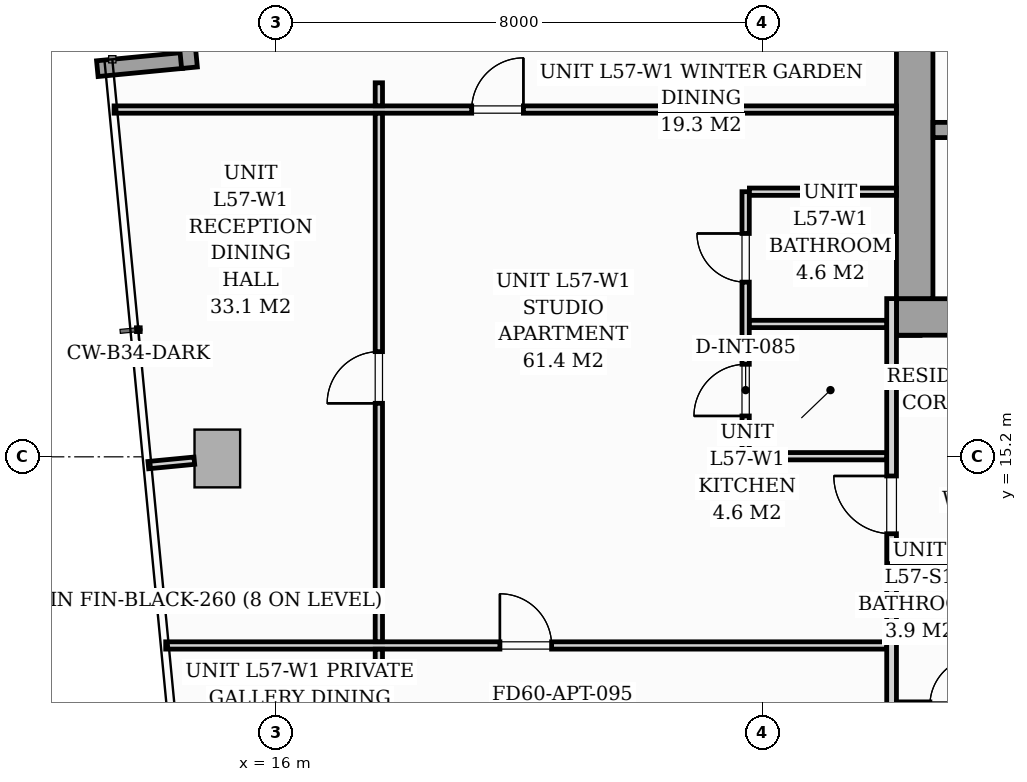
"""IFC4 building model, lengths in metres.
Left out: names, types, materials, properties, quantities, classifications, styles, units other than length and angle.
Written with IfcOpenShell. Run it as: python <this file> out.ifc"""

import sys

from ifc_helpers import new_model, si_unit, direction, frame, frame_2d, origin, origin_2d, place, context, subcontext, project, spatial, rectangle, i_section, extrude, source, transform, mapped, element, fill, save


model = new_model("IFC4")
c1 = context("Model", 3, precision=1e-05, world=origin(), true_north=direction((0.0, 1.0)))
c2 = subcontext(c1, "Body", "Model", "MODEL_VIEW")
j1 = project(units=[si_unit("LENGTHUNIT", "METRE"), si_unit("PLANEANGLEUNIT", "RADIAN")], contexts=[c1])
p1 = place(None, origin())
s1 = spatial("IfcSite", under=j1, at=p1, CompositionType="ELEMENT")
p2 = place(p1, origin())
s2 = spatial("IfcBuilding", under=s1, at=p2, CompositionType="ELEMENT")
p3 = place(p2, frame((0.0, 0.0, 198.6)))
s3 = spatial("IfcBuildingStorey", under=s2, at=p3, CompositionType="ELEMENT", Elevation=198.6)
m1 = source(origin(), c2, "Body", "SweptSolid", [
    extrude(i_section(OverallWidth=0.416, OverallDepth=0.446, WebThickness=0.039, FlangeThickness=0.063, FilletRadius=0.018, at=origin_2d()), origin(), (0.0, 0.0, 1.0), 3.196),
])
p4 = place(p3, frame((26.4, 17.4, 0.002), z_axis=(0.0, 0.0, 1.0), x_axis=(1.0, 0.0, 0.0)))
e1 = element("IfcColumn", 1, at=p4, inside=s3, PredefinedType="PILASTER", context=c2, shape_type="MappedRepresentation", body=[
    mapped(m1, transform((0.0, 0.0, 0.0), scale=1.0)),
])
m2 = source(origin(), c2, "Body", "SweptSolid", [
    extrude(rectangle(XDim=0.75, YDim=0.95, at=origin_2d()), origin(), (0.0, 0.0, 1.0), 3.196),
])
p5 = place(p3, frame((15.032, 15.173, 0.002), z_axis=(0.0, 0.0, 1.0), x_axis=(0.995396198367, 0.09584575252, 0.0)))
e2 = element("IfcColumn", 2, at=p5, inside=s3, PredefinedType="COLUMN", context=c2, shape_type="MappedRepresentation", body=[
    mapped(m2, transform((0.0, 0.0, 0.0), scale=1.0)),
])
p6 = place(p3, frame((13.058, 21.583, 0.0), z_axis=(0.0, 0.0, 1.0), x_axis=(0.99540774648, 0.095725744959, 0.0)))
e3 = element("IfcWall", 3, at=p6, inside=s3, PredefinedType="STANDARD", context=c2, shape_type="SweptSolid", body=[
    extrude(rectangle(XDim=1.395, YDim=0.26, at=frame_2d((0.698, 0.0))), origin(), (0.0, 0.0, 1.0), 2.94),
])
p7 = place(p3, frame((14.574, 21.599, 0.0), z_axis=(0.0, 0.0, 1.0), x_axis=(-0.095742423056, 0.99540614245, 0.0)))
e4 = element("IfcWall", 4, at=p7, inside=s3, PredefinedType="STANDARD", context=c2, shape_type="SweptSolid", body=[
    extrude(rectangle(XDim=1.395, YDim=0.26, at=frame_2d((0.697, 0.0))), origin(), (0.0, 0.0, 1.0), 2.94),
])
p8 = place(p3, frame((26.2, 17.5, 0.0), z_axis=(0.0, 0.0, 1.0), x_axis=(1.0, 0.0, 0.0)))
e5 = element("IfcWall", 5, at=p8, inside=s3, PredefinedType="SHEAR", context=c2, shape_type="SweptSolid", body=[
    extrude(rectangle(XDim=19.6, YDim=0.6, at=frame_2d((9.8, 0.0))), origin(), (0.0, 0.0, 1.0), 3.2),
])
p9 = place(p8, frame((0.95, 0.0, 0.0)))
e6 = element("IfcOpeningElement", 6, at=p9, cuts=e5, PredefinedType="OPENING", context=c2, shape_type="SweptSolid", body=[
    extrude(rectangle(XDim=0.95, YDim=2.06, at=frame_2d((0.475, 1.03))), frame((0.0, 0.31, 0.0), z_axis=(0.0, -1.0, 0.0), x_axis=(1.0, 0.0, 0.0)), (0.0, 0.0, 1.0), 0.62),
])
p10 = place(p8, frame((9.38, 0.0, 0.0)))
e7 = element("IfcOpeningElement", 7, at=p10, cuts=e5, PredefinedType="OPENING", context=c2, shape_type="SweptSolid", body=[
    extrude(rectangle(XDim=0.85, YDim=2.0, at=frame_2d((0.425, 1.0))), frame((0.0, 0.31, 0.0), z_axis=(0.0, -1.0, 0.0), x_axis=(1.0, 0.0, 0.0)), (0.0, 0.0, 1.0), 0.62),
])
p11 = place(p8, frame((17.55, 0.0, 0.0)))
e8 = element("IfcOpeningElement", 8, at=p11, cuts=e5, PredefinedType="OPENING", context=c2, shape_type="SweptSolid", body=[
    extrude(rectangle(XDim=0.95, YDim=2.06, at=frame_2d((0.475, 1.03))), frame((0.0, 0.31, 0.0), z_axis=(0.0, -1.0, 0.0), x_axis=(1.0, 0.0, 0.0)), (0.0, 0.0, 1.0), 0.62),
])
p12 = place(p3, frame((26.5, 17.802, 0.0), z_axis=(0.0, 0.0, 1.0), x_axis=(0.0, 1.0, 0.0)))
e9 = element("IfcWall", 9, at=p12, inside=s3, PredefinedType="SHEAR", context=c2, shape_type="SweptSolid", body=[
    extrude(rectangle(XDim=5.796, YDim=0.6, at=frame_2d((2.898, 0.0))), origin(), (0.0, 0.0, 1.0), 3.2),
])
p13 = place(p3, frame((26.802, 20.575, 0.0), z_axis=(0.0, 0.0, 1.0), x_axis=(1.0, 0.0, 0.0)))
e10 = element("IfcWall", 10, at=p13, inside=s3, PredefinedType="SOLIDWALL", context=c2, shape_type="SweptSolid", body=[
    extrude(rectangle(XDim=8.148, YDim=0.25, at=frame_2d((4.074, 0.0))), origin(), (0.0, 0.0, 1.0), 3.2),
])
p14 = place(p13, frame((0.298, 0.0, 0.0)))
e11 = element("IfcOpeningElement", 11, at=p14, cuts=e10, PredefinedType="OPENING", context=c2, shape_type="SweptSolid", body=[
    extrude(rectangle(XDim=0.95, YDim=2.06, at=frame_2d((0.475, 1.03))), frame((0.0, 0.135, 0.0), z_axis=(0.0, -1.0, 0.0), x_axis=(1.0, 0.0, 0.0)), (0.0, 0.0, 1.0), 0.27),
])
p15 = place(p3, frame((26.12, 13.36, 0.0), z_axis=(0.0, 0.0, 1.0), x_axis=(1.0, 0.0, 0.0)))
e12 = element("IfcWall", 12, at=p15, inside=s3, PredefinedType="PARTITIONING", context=c2, shape_type="SweptSolid", body=[
    extrude(rectangle(XDim=19.76, YDim=0.16, at=frame_2d((9.88, 0.0))), origin(), (0.0, 0.0, 1.0), 2.94),
])
p16 = place(p15, frame((5.221, 0.0, 0.0)))
e13 = element("IfcOpeningElement", 13, at=p16, cuts=e12, PredefinedType="OPENING", context=c2, shape_type="SweptSolid", body=[
    extrude(rectangle(XDim=0.95, YDim=2.06, at=frame_2d((0.475, 1.03))), frame((0.0, 0.09, 0.0), z_axis=(0.0, -1.0, 0.0), x_axis=(1.0, 0.0, 0.0)), (0.0, 0.0, 1.0), 0.18),
])
p17 = place(p15, frame((12.119, 0.0, 0.0)))
e14 = element("IfcOpeningElement", 14, at=p17, cuts=e12, PredefinedType="OPENING", context=c2, shape_type="SweptSolid", body=[
    extrude(rectangle(XDim=0.95, YDim=2.06, at=frame_2d((0.475, 1.03))), frame((0.0, 0.09, 0.0), z_axis=(0.0, -1.0, 0.0), x_axis=(1.0, 0.0, 0.0)), (0.0, 0.0, 1.0), 0.18),
])
p18 = place(p15, frame((14.492, 0.0, 0.0)))
e15 = element("IfcOpeningElement", 15, at=p18, cuts=e12, PredefinedType="OPENING", context=c2, shape_type="SweptSolid", body=[
    extrude(rectangle(XDim=0.95, YDim=2.06, at=frame_2d((0.475, 1.03))), frame((0.0, 0.09, 0.0), z_axis=(0.0, -1.0, 0.0), x_axis=(1.0, 0.0, 0.0)), (0.0, 0.0, 1.0), 0.18),
])
p19 = place(p3, frame((26.12, 7.261, 0.0), z_axis=(0.0, 0.0, 1.0), x_axis=(0.0, 1.0, 0.0)))
e16 = element("IfcWall", 16, at=p19, inside=s3, PredefinedType="PARTITIONING", context=c2, shape_type="SweptSolid", body=[
    extrude(rectangle(XDim=6.017, YDim=0.16, at=frame_2d((3.008, 0.0))), origin(), (0.0, 0.0, 1.0), 2.94),
])
p20 = place(p3, frame((26.12, 13.442, 0.0), z_axis=(0.0, 0.0, 1.0), x_axis=(0.0, 1.0, 0.0)))
e17 = element("IfcWall", 17, at=p20, inside=s3, PredefinedType="PARTITIONING", context=c2, shape_type="SweptSolid", body=[
    extrude(rectangle(XDim=4.36, YDim=0.16, at=frame_2d((2.18, 0.0))), origin(), (0.0, 0.0, 1.0), 2.94),
])
p21 = place(p20, frame((0.493, 0.0, 0.0)))
e18 = element("IfcOpeningElement", 18, at=p21, cuts=e17, PredefinedType="OPENING", context=c2, shape_type="SweptSolid", body=[
    extrude(rectangle(XDim=0.95, YDim=2.06, at=frame_2d((0.475, 1.03))), frame((0.0, 0.09, 0.0), z_axis=(0.0, -1.0, 0.0), x_axis=(1.0, 0.0, 0.0)), (0.0, 0.0, 1.0), 0.18),
])
p22 = place(p3, frame((26.202, 11.11, 0.0), z_axis=(0.0, 0.0, 1.0), x_axis=(1.0, 0.0, 0.0)))
e19 = element("IfcWall", 19, at=p22, inside=s3, PredefinedType="PARTITIONING", context=c2, shape_type="SweptSolid", body=[
    extrude(rectangle(XDim=4.098, YDim=0.12, at=frame_2d((2.049, 0.0))), origin(), (0.0, 0.0, 1.0), 2.94),
])
p23 = place(p22, frame((0.548, 0.0, 0.0)))
e20 = element("IfcOpeningElement", 20, at=p23, cuts=e19, PredefinedType="OPENING", context=c2, shape_type="SweptSolid", body=[
    extrude(rectangle(XDim=0.8, YDim=2.02, at=frame_2d((0.4, 1.01))), frame((0.0, 0.07, 0.0), z_axis=(0.0, -1.0, 0.0), x_axis=(1.0, 0.0, 0.0)), (0.0, 0.0, 1.0), 0.14),
])
p24 = place(p22, frame((2.573, 0.0, 0.0)))
e21 = element("IfcOpeningElement", 21, at=p24, cuts=e19, PredefinedType="OPENING", context=c2, shape_type="SweptSolid", body=[
    extrude(rectangle(XDim=0.85, YDim=2.05, at=frame_2d((0.425, 1.025))), frame((0.0, 0.07, 0.0), z_axis=(0.0, -1.0, 0.0), x_axis=(1.0, 0.0, 0.0)), (0.0, 0.0, 1.0), 0.14),
])
p25 = place(p3, frame((23.72, 15.21, 0.0), z_axis=(0.0, 0.0, 1.0), x_axis=(0.0, 1.0, 0.0)))
e22 = element("IfcWall", 22, at=p25, inside=s3, PredefinedType="PARTITIONING", context=c2, shape_type="SweptSolid", body=[
    extrude(rectangle(XDim=4.35, YDim=0.12, at=frame_2d((2.175, 0.0))), origin(), (0.0, 0.0, 1.0), 2.94),
])
p26 = place(p25, frame((0.662, 0.0, 0.0)))
e23 = element("IfcOpeningElement", 23, at=p26, cuts=e22, PredefinedType="OPENING", context=c2, shape_type="SweptSolid", body=[
    extrude(rectangle(XDim=0.85, YDim=2.05, at=frame_2d((0.425, 1.025))), frame((0.0, 0.07, 0.0), z_axis=(0.0, -1.0, 0.0), x_axis=(1.0, 0.0, 0.0)), (0.0, 0.0, 1.0), 0.14),
])
p27 = place(p25, frame((2.863, 0.0, 0.0)))
e24 = element("IfcOpeningElement", 24, at=p27, cuts=e22, PredefinedType="OPENING", context=c2, shape_type="SweptSolid", body=[
    extrude(rectangle(XDim=0.8, YDim=2.02, at=frame_2d((0.4, 1.01))), frame((0.0, 0.07, 0.0), z_axis=(0.0, -1.0, 0.0), x_axis=(1.0, 0.0, 0.0)), (0.0, 0.0, 1.0), 0.14),
])
p28 = place(p3, frame((23.782, 17.385, 0.0), z_axis=(0.0, 0.0, 1.0), x_axis=(1.0, 0.0, 0.0)))
e25 = element("IfcWall", 25, at=p28, inside=s3, PredefinedType="PARTITIONING", context=c2, shape_type="SweptSolid", body=[
    extrude(rectangle(XDim=2.256, YDim=0.12, at=frame_2d((1.128, 0.0))), origin(), (0.0, 0.0, 1.0), 2.281),
])
p29 = place(p3, frame((23.782, 15.21, 0.0), z_axis=(0.0, 0.0, 1.0), x_axis=(1.0, 0.0, 0.0)))
e26 = element("IfcWall", 26, at=p29, inside=s3, PredefinedType="PARTITIONING", context=c2, shape_type="SweptSolid", body=[
    extrude(rectangle(XDim=2.256, YDim=0.12, at=frame_2d((1.128, 0.0))), origin(), (0.0, 0.0, 1.0), 2.94),
])
p30 = place(p3, frame((23.782, 19.56, 0.0), z_axis=(0.0, 0.0, 1.0), x_axis=(1.0, 0.0, 0.0)))
e27 = element("IfcWall", 27, at=p30, inside=s3, PredefinedType="PARTITIONING", context=c2, shape_type="SweptSolid", body=[
    extrude(rectangle(XDim=2.416, YDim=0.12, at=frame_2d((1.208, 0.0))), origin(), (0.0, 0.0, 1.0), 2.94),
])
p31 = place(p3, frame((14.183, 12.098, 0.0), z_axis=(0.0, 0.0, 1.0), x_axis=(1.0, 0.0, 0.0)))
e28 = element("IfcWall", 28, at=p31, inside=s3, PredefinedType="PARTITIONING", context=c2, shape_type="SweptSolid", body=[
    extrude(rectangle(XDim=11.855, YDim=0.12, at=frame_2d((5.928, 0.0))), origin(), (0.0, 0.0, 1.0), 2.94),
])
p32 = place(p31, frame((5.496, 0.0, 0.0)))
e29 = element("IfcOpeningElement", 29, at=p32, cuts=e28, PredefinedType="OPENING", context=c2, shape_type="SweptSolid", body=[
    extrude(rectangle(XDim=0.85, YDim=2.05, at=frame_2d((0.425, 1.025))), frame((0.0, 0.07, 0.0), z_axis=(0.0, -1.0, 0.0), x_axis=(1.0, 0.0, 0.0)), (0.0, 0.0, 1.0), 0.14),
])
p33 = place(p3, frame((13.334, 20.911, 0.0), z_axis=(0.0, 0.0, 1.0), x_axis=(1.0, 0.0, 0.0)))
e30 = element("IfcWall", 30, at=p33, inside=s3, PredefinedType="PARTITIONING", context=c2, shape_type="SweptSolid", body=[
    extrude(rectangle(XDim=12.864, YDim=0.12, at=frame_2d((6.432, 0.0))), origin(), (0.0, 0.0, 1.0), 2.94),
])
p34 = place(p33, frame((5.881, 0.0, 0.0)))
e31 = element("IfcOpeningElement", 31, at=p34, cuts=e30, PredefinedType="OPENING", context=c2, shape_type="SweptSolid", body=[
    extrude(rectangle(XDim=0.85, YDim=2.05, at=frame_2d((0.425, 1.025))), frame((0.0, 0.07, 0.0), z_axis=(0.0, -1.0, 0.0), x_axis=(1.0, 0.0, 0.0)), (0.0, 0.0, 1.0), 0.14),
])
p35 = place(p3, frame((17.688, 11.658, 0.0), z_axis=(0.0, 0.0, 1.0), x_axis=(0.0, 1.0, 0.0)))
e32 = element("IfcWall", 32, at=p35, inside=s3, PredefinedType="PARTITIONING", context=c2, shape_type="SweptSolid", body=[
    extrude(rectangle(XDim=0.378, YDim=0.12, at=frame_2d((0.189, 0.0))), origin(), (0.0, 0.0, 1.0), 2.94),
])
p36 = place(p3, frame((17.688, 12.16, 0.0), z_axis=(0.0, 0.0, 1.0), x_axis=(0.0, 1.0, 0.0)))
e33 = element("IfcWall", 33, at=p36, inside=s3, PredefinedType="PARTITIONING", context=c2, shape_type="SweptSolid", body=[
    extrude(rectangle(XDim=8.689, YDim=0.12, at=frame_2d((4.345, 0.0))), origin(), (0.0, 0.0, 1.0), 2.94),
])
p37 = place(p36, frame((3.92, 0.0, 0.0)))
e34 = element("IfcOpeningElement", 34, at=p37, cuts=e33, PredefinedType="OPENING", context=c2, shape_type="SweptSolid", body=[
    extrude(rectangle(XDim=0.85, YDim=2.05, at=frame_2d((0.425, 1.025))), frame((0.0, 0.07, 0.0), z_axis=(0.0, -1.0, 0.0), x_axis=(1.0, 0.0, 0.0)), (0.0, 0.0, 1.0), 0.14),
])
p38 = place(p3, frame((17.688, 20.973, 0.0), z_axis=(0.0, 0.0, 1.0), x_axis=(0.0, 1.0, 0.0)))
e35 = element("IfcWall", 35, at=p38, inside=s3, PredefinedType="PARTITIONING", context=c2, shape_type="SweptSolid", body=[
    extrude(rectangle(XDim=0.378, YDim=0.12, at=frame_2d((0.189, 0.0))), origin(), (0.0, 0.0, 1.0), 2.94),
])
p39 = place(p3, frame((14.654, 15.136, 0.0), z_axis=(0.0, 0.0, 1.0), x_axis=(-0.995408440582, -0.095718527039, 0.0)))
e36 = element("IfcWall", 36, at=p39, inside=s3, PredefinedType="PARTITIONING", context=c2, shape_type="SweptSolid", body=[
    extrude(rectangle(XDim=0.76, YDim=0.12, at=frame_2d((0.38, 0.0))), origin(), (0.0, 0.0, 1.0), 2.94),
])
m3 = source(origin(), c2, "Body", "SweptSolid", [
    extrude(rectangle(XDim=0.95, YDim=2.06, at=frame_2d((0.475, 1.03))), frame((0.0, 0.025, 0.0), z_axis=(0.0, -1.0, 0.0), x_axis=(1.0, 0.0, 0.0)), (0.0, 0.0, 1.0), 0.05),
])
p40 = place(p21, origin())
e37 = element("IfcDoor", 37, at=p40, inside=s3, OperationType="SINGLE_SWING_RIGHT", PredefinedType="DOOR", context=c2, shape_type="MappedRepresentation", body=[
    mapped(m3, transform((0.0, 0.0, 0.0), scale=1.0)),
])
fill(e18, e37)
m4 = source(origin(), c2, "Body", "SweptSolid", [
    extrude(rectangle(XDim=0.85, YDim=2.05, at=frame_2d((0.425, 1.025))), frame((0.0, 0.025, 0.0), z_axis=(0.0, -1.0, 0.0), x_axis=(1.0, 0.0, 0.0)), (0.0, 0.0, 1.0), 0.05),
])
p41 = place(p26, origin())
e38 = element("IfcDoor", 38, at=p41, inside=s3, OperationType="SINGLE_SWING_LEFT", PredefinedType="DOOR", context=c2, shape_type="MappedRepresentation", body=[
    mapped(m4, transform((0.0, 0.0, 0.0), scale=1.0)),
])
fill(e23, e38)
m5 = source(origin(), c2, "Body", "SweptSolid", [
    extrude(rectangle(XDim=0.8, YDim=2.02, at=frame_2d((0.4, 1.01))), frame((0.0, 0.025, 0.0), z_axis=(0.0, -1.0, 0.0), x_axis=(1.0, 0.0, 0.0)), (0.0, 0.0, 1.0), 0.05),
])
p42 = place(p27, origin())
e39 = element("IfcDoor", 39, at=p42, inside=s3, OperationType="SINGLE_SWING_RIGHT", PredefinedType="DOOR", context=c2, shape_type="MappedRepresentation", body=[
    mapped(m5, transform((0.0, 0.0, 0.0), scale=1.0)),
])
fill(e24, e39)
p43 = place(p32, origin())
e40 = element("IfcDoor", 40, at=p43, inside=s3, OperationType="SINGLE_SWING_LEFT", PredefinedType="DOOR", context=c2, shape_type="MappedRepresentation", body=[
    mapped(m4, transform((0.0, 0.0, 0.0), scale=1.0)),
])
fill(e29, e40)
p44 = place(p34, origin())
e41 = element("IfcDoor", 41, at=p44, inside=s3, OperationType="SINGLE_SWING_RIGHT", PredefinedType="DOOR", context=c2, shape_type="MappedRepresentation", body=[
    mapped(m4, transform((0.0, 0.0, 0.0), scale=1.0)),
])
fill(e31, e41)
p45 = place(p37, origin())
e42 = element("IfcDoor", 42, at=p45, inside=s3, OperationType="SINGLE_SWING_LEFT", PredefinedType="DOOR", context=c2, shape_type="MappedRepresentation", body=[
    mapped(m4, transform((0.0, 0.0, 0.0), scale=1.0)),
])
fill(e34, e42)
save(model, sys.argv[1])
